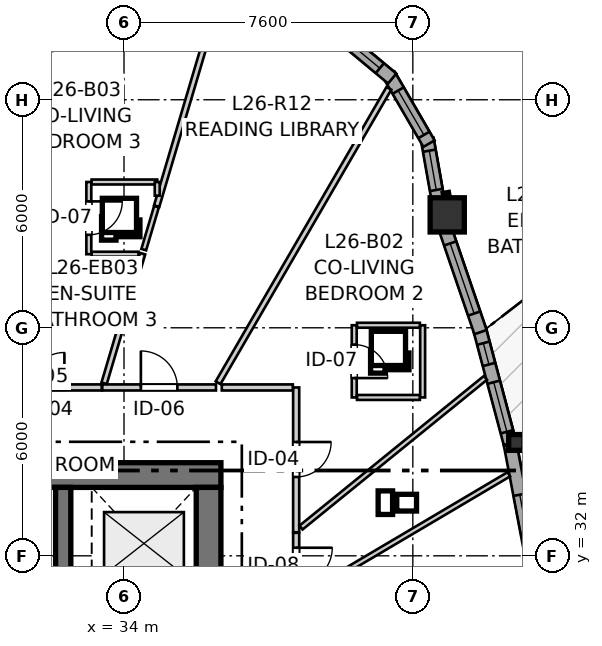
"""IFC4 building model, lengths in metres.
Left out: names, types, materials, properties, quantities, classifications, styles, units other than length and angle.
Written with IfcOpenShell. Run it as: python <this file> out.ifc"""

import sys

from ifc_helpers import new_model, si_unit, direction, frame, frame_2d, origin, origin_2d, place, context, subcontext, project, spatial, rectangle, i_section, extrude, source, transform, mapped, element, fill, save


model = new_model("IFC4")
c1 = context("Model", 3, precision=1e-05, world=origin(), true_north=direction((0.0, 1.0)))
c2 = subcontext(c1, "Body", "Model", "MODEL_VIEW")
j1 = project(units=[si_unit("LENGTHUNIT", "METRE"), si_unit("PLANEANGLEUNIT", "RADIAN")], contexts=[c1])
p1 = place(None, origin())
s1 = spatial("IfcSite", under=j1, at=p1, CompositionType="ELEMENT")
p2 = place(p1, origin())
s2 = spatial("IfcBuilding", under=s1, at=p2, CompositionType="ELEMENT")
p3 = place(p2, frame((0.0, 0.0, 89.6)))
s3 = spatial("IfcBuildingStorey", under=s2, at=p3, CompositionType="ELEMENT", Elevation=89.6)
p4 = place(p3, frame((36.55, 34.125, 0.0), z_axis=(0.0, 0.0, 1.0), x_axis=(-1.0, 0.0, 0.0)))
e1 = element("IfcWall", 1, at=p4, inside=s3, PredefinedType="SHEAR", context=c2, shape_type="SweptSolid", body=[
    extrude(rectangle(XDim=12.4, YDim=0.65, at=frame_2d((6.2, 0.0))), origin(), (0.0, 0.0, 1.0), 2.95),
])
p5 = place(p3, frame((36.225, 18.2, 0.0), z_axis=(0.0, 0.0, 1.0), x_axis=(0.0, 1.0, 0.0)))
e2 = element("IfcWall", 2, at=p5, inside=s3, PredefinedType="SHEAR", context=c2, shape_type="SweptSolid", body=[
    extrude(rectangle(XDim=15.6, YDim=0.65, at=frame_2d((7.8, 0.0))), origin(), (0.0, 0.0, 1.0), 2.95),
])
p6 = place(p5, frame((4.25, 0.0, 0.0)))
e3 = element("IfcOpeningElement", 3, at=p6, cuts=e2, PredefinedType="OPENING", context=c2, shape_type="SweptSolid", body=[
    extrude(rectangle(XDim=1.1, YDim=2.15, at=frame_2d((0.55, 1.075))), frame((0.0, 0.335, 0.0), z_axis=(0.0, -1.0, 0.0), x_axis=(1.0, 0.0, 0.0)), (0.0, 0.0, 1.0), 0.67),
])
p7 = place(p5, frame((10.25, 0.0, 0.0)))
e4 = element("IfcOpeningElement", 4, at=p7, cuts=e2, PredefinedType="OPENING", context=c2, shape_type="SweptSolid", body=[
    extrude(rectangle(XDim=1.1, YDim=2.15, at=frame_2d((0.55, 1.075))), frame((0.0, 0.335, 0.0), z_axis=(0.0, -1.0, 0.0), x_axis=(1.0, 0.0, 0.0)), (0.0, 0.0, 1.0), 0.67),
])
p8 = place(p3, frame((32.4, 30.85, 0.0), z_axis=(0.0, 0.0, 1.0), x_axis=(0.0, 1.0, 0.0)))
e5 = element("IfcWall", 5, at=p8, inside=s3, PredefinedType="SHEAR", context=c2, shape_type="SweptSolid", body=[
    extrude(rectangle(XDim=2.95, YDim=0.4, at=frame_2d((1.475, 0.0))), origin(), (0.0, 0.0, 1.0), 2.95),
])
m1 = source(origin(), c2, "Body", "SweptSolid", [
    extrude(i_section(OverallWidth=0.406, OverallDepth=0.416, WebThickness=0.027, FlangeThickness=0.044, FilletRadius=0.015, at=origin_2d()), origin(), (0.0, 0.0, 1.0), 2.95),
])
p9 = place(p3, frame((44.325, 34.983, 0.0), z_axis=(0.0, 0.0, 1.0), x_axis=(1.0, 0.0, 0.0)))
e6 = element("IfcColumn", 6, at=p9, inside=s3, PredefinedType="PILASTER", context=c2, shape_type="MappedRepresentation", body=[
    mapped(m1, transform((0.0, 0.0, 0.0), x_axis=(1.0, 0.0, 0.0), y_axis=(0.0, 1.0, 0.0), z_axis=(0.0, 0.0, 1.0), scale=1.0)),
])
m2 = source(origin(), c2, "Body", "SweptSolid", [
    extrude(rectangle(XDim=0.9, YDim=0.9, at=origin_2d()), origin(), (0.0, 0.0, 1.0), 2.95),
])
p10 = place(p3, frame((42.505, 40.971, 0.0), z_axis=(0.0, 0.0, 1.0), x_axis=(1.0, 0.0, 0.0)))
e7 = element("IfcColumn", 7, at=p10, inside=s3, PredefinedType="COLUMN", context=c2, shape_type="MappedRepresentation", body=[
    mapped(m2, transform((0.0, 0.0, 0.0), x_axis=(1.0, 0.0, 0.0), y_axis=(0.0, 1.0, 0.0), z_axis=(0.0, 0.0, 1.0), scale=1.0)),
])
p11 = place(p3, frame((44.735, 31.919, 0.0), z_axis=(0.0, 0.0, 1.0), x_axis=(-0.186735196273, 0.982410284185, 0.0)))
e8 = element("IfcWall", 8, at=p11, inside=s3, PredefinedType="SOLIDWALL", context=c2, shape_type="SweptSolid", body=[
    extrude(rectangle(XDim=3.066, YDim=0.34, at=frame_2d((1.533, 0.0))), origin(), (0.0, 0.0, 1.0), 2.48),
])
p12 = place(p11, frame((0.669, 0.0, 0.82)))
e9 = element("IfcOpeningElement", 9, at=p12, cuts=e8, PredefinedType="OPENING", context=c2, shape_type="SweptSolid", body=[
    extrude(rectangle(XDim=1.05, YDim=1.45, at=frame_2d((0.525, 0.725))), frame((0.0, 0.18, 0.0), z_axis=(0.0, -1.0, 0.0), x_axis=(1.0, 0.0, 0.0)), (0.0, 0.0, 1.0), 0.36),
])
p13 = place(p3, frame((44.156, 34.958, 0.0), z_axis=(0.0, 0.0, 1.0), x_axis=(-0.257033600382, 0.966402467026, 0.0)))
e10 = element("IfcWall", 10, at=p13, inside=s3, PredefinedType="SOLIDWALL", context=c2, shape_type="SweptSolid", body=[
    extrude(rectangle(XDim=3.116, YDim=0.34, at=frame_2d((1.558, 0.0))), origin(), (0.0, 0.0, 1.0), 2.48),
])
p14 = place(p13, frame((0.315, 0.0, 0.82)))
e11 = element("IfcOpeningElement", 11, at=p14, cuts=e10, PredefinedType="OPENING", context=c2, shape_type="SweptSolid", body=[
    extrude(rectangle(XDim=1.35, YDim=1.45, at=frame_2d((0.675, 0.725))), frame((0.0, 0.18, 0.0), z_axis=(0.0, -1.0, 0.0), x_axis=(1.0, 0.0, 0.0)), (0.0, 0.0, 1.0), 0.36),
])
p15 = place(p13, frame((2.148, 0.0, 0.82)))
e12 = element("IfcOpeningElement", 12, at=p15, cuts=e10, PredefinedType="OPENING", context=c2, shape_type="SweptSolid", body=[
    extrude(rectangle(XDim=0.58, YDim=1.35, at=frame_2d((0.29, 0.675))), frame((0.0, 0.18, 0.0), z_axis=(0.0, -1.0, 0.0), x_axis=(1.0, 0.0, 0.0)), (0.0, 0.0, 1.0), 0.36),
])
p16 = place(p3, frame((43.38, 37.886, 0.0), z_axis=(0.0, 0.0, 1.0), x_axis=(-0.323536742898, 0.946215607562, 0.0)))
e13 = element("IfcWall", 13, at=p16, inside=s3, PredefinedType="SOLIDWALL", context=c2, shape_type="SweptSolid", body=[
    extrude(rectangle(XDim=2.972, YDim=0.34, at=frame_2d((1.486, 0.0))), origin(), (0.0, 0.0, 1.0), 2.48),
])
p17 = place(p16, frame((0.516, 0.0, 0.82)))
e14 = element("IfcOpeningElement", 14, at=p17, cuts=e13, PredefinedType="OPENING", context=c2, shape_type="SweptSolid", body=[
    extrude(rectangle(XDim=1.95, YDim=1.4, at=frame_2d((0.975, 0.7))), frame((0.0, 0.18, 0.0), z_axis=(0.0, -1.0, 0.0), x_axis=(1.0, 0.0, 0.0)), (0.0, 0.0, 1.0), 0.36),
])
p18 = place(p3, frame((42.298, 41.168, 0.0), z_axis=(0.0, 0.0, 1.0), x_axis=(-0.17440141227, 0.984674640375, 0.0)))
e15 = element("IfcWall", 15, at=p18, inside=s3, PredefinedType="SOLIDWALL", context=c2, shape_type="SweptSolid", body=[
    extrude(rectangle(XDim=1.831, YDim=0.34, at=frame_2d((0.916, 0.0))), origin(), (0.0, 0.0, 1.0), 2.48),
])
p19 = place(p18, frame((0.466, 0.0, 0.82)))
e16 = element("IfcOpeningElement", 16, at=p19, cuts=e15, PredefinedType="OPENING", context=c2, shape_type="SweptSolid", body=[
    extrude(rectangle(XDim=1.05, YDim=1.45, at=frame_2d((0.525, 0.725))), frame((0.0, 0.18, 0.0), z_axis=(0.0, -1.0, 0.0), x_axis=(1.0, 0.0, 0.0)), (0.0, 0.0, 1.0), 0.36),
])
p20 = place(p3, frame((42.024, 42.845, 0.0), z_axis=(0.0, 0.0, 1.0), x_axis=(-0.501902596059, 0.864924149315, 0.0)))
e17 = element("IfcWall", 17, at=p20, inside=s3, PredefinedType="SOLIDWALL", context=c2, shape_type="SweptSolid", body=[
    extrude(rectangle(XDim=2.099, YDim=0.34, at=frame_2d((1.049, 0.0))), origin(), (0.0, 0.0, 1.0), 2.48),
])
p21 = place(p20, frame((0.265, 0.0, 0.82)))
e18 = element("IfcOpeningElement", 18, at=p21, cuts=e17, PredefinedType="OPENING", context=c2, shape_type="SweptSolid", body=[
    extrude(rectangle(XDim=1.35, YDim=1.45, at=frame_2d((0.675, 0.725))), frame((0.0, 0.18, 0.0), z_axis=(0.0, -1.0, 0.0), x_axis=(1.0, 0.0, 0.0)), (0.0, 0.0, 1.0), 0.36),
])
p22 = place(p3, frame((41.057, 44.558, 0.0), z_axis=(0.0, 0.0, 1.0), x_axis=(-0.768497696041, 0.639852554249, 0.0)))
e19 = element("IfcWall", 19, at=p22, inside=s3, PredefinedType="SOLIDWALL", context=c2, shape_type="SweptSolid", body=[
    extrude(rectangle(XDim=2.099, YDim=0.34, at=frame_2d((1.049, 0.0))), origin(), (0.0, 0.0, 1.0), 2.48),
])
p23 = place(p22, frame((0.425, 0.0, 0.82)))
e20 = element("IfcOpeningElement", 20, at=p23, cuts=e19, PredefinedType="OPENING", context=c2, shape_type="SweptSolid", body=[
    extrude(rectangle(XDim=1.25, YDim=1.35, at=frame_2d((0.625, 0.675))), frame((0.0, 0.18, 0.0), z_axis=(0.0, -1.0, 0.0), x_axis=(1.0, 0.0, 0.0)), (0.0, 0.0, 1.0), 0.36),
])
p24 = place(p3, frame((33.774, 45.797, 0.0), z_axis=(0.0, 0.0, 1.0), x_axis=(-0.979428519707, -0.201791414051, 0.0)))
e21 = element("IfcWall", 21, at=p24, inside=s3, PredefinedType="SOLIDWALL", context=c2, shape_type="SweptSolid", body=[
    extrude(rectangle(XDim=3.134, YDim=0.34, at=frame_2d((1.567, 0.0))), origin(), (0.0, 0.0, 1.0), 2.48),
])
p25 = place(p24, frame((0.832, 0.0, 0.82)))
e22 = element("IfcOpeningElement", 22, at=p25, cuts=e21, PredefinedType="OPENING", context=c2, shape_type="SweptSolid", body=[
    extrude(rectangle(XDim=1.45, YDim=1.25, at=frame_2d((0.725, 0.625))), frame((0.0, 0.18, 0.0), z_axis=(0.0, -1.0, 0.0), x_axis=(1.0, 0.0, 0.0)), (0.0, 0.0, 1.0), 0.36),
])
p26 = place(p3, frame((38.53, 36.43, 0.0), z_axis=(0.0, 0.0, 1.0), x_axis=(0.0, -1.0, 0.0)))
e23 = element("IfcWall", 23, at=p26, inside=s3, PredefinedType="PARTITIONING", context=c2, shape_type="SweptSolid", body=[
    extrude(rectangle(XDim=3.81, YDim=0.16, at=frame_2d((1.905, 0.0))), origin(), (0.0, 0.0, 1.0), 2.588),
])
p27 = place(p26, frame((1.436, 0.0, 0.0)))
e24 = element("IfcOpeningElement", 24, at=p27, cuts=e23, PredefinedType="OPENING", context=c2, shape_type="SweptSolid", body=[
    extrude(rectangle(XDim=0.92, YDim=2.1, at=frame_2d((0.46, 1.05))), frame((0.0, 0.09, 0.0), z_axis=(0.0, -1.0, 0.0), x_axis=(1.0, 0.0, 0.0)), (0.0, 0.0, 1.0), 0.18),
])
p28 = place(p3, frame((33.428, 36.43, 0.0), z_axis=(0.0, 0.0, 1.0), x_axis=(1.0, 0.0, 0.0)))
e25 = element("IfcWall", 25, at=p28, inside=s3, PredefinedType="PARTITIONING", context=c2, shape_type="SweptSolid", body=[
    extrude(rectangle(XDim=2.992, YDim=0.16, at=frame_2d((1.496, 0.0))), origin(), (0.0, 0.0, 1.0), 2.95),
])
p29 = place(p28, frame((1.015, 0.0, 0.0)))
e26 = element("IfcOpeningElement", 26, at=p29, cuts=e25, PredefinedType="OPENING", context=c2, shape_type="SweptSolid", body=[
    extrude(rectangle(XDim=0.96, YDim=2.1, at=frame_2d((0.48, 1.05))), frame((0.0, 0.09, 0.0), z_axis=(0.0, -1.0, 0.0), x_axis=(1.0, 0.0, 0.0)), (0.0, 0.0, 1.0), 0.18),
])
p30 = place(p3, frame((30.529, 36.43, 0.0), z_axis=(0.0, 0.0, 1.0), x_axis=(1.0, 0.0, 0.0)))
e27 = element("IfcWall", 27, at=p30, inside=s3, PredefinedType="PARTITIONING", context=c2, shape_type="SweptSolid", body=[
    extrude(rectangle(XDim=2.884, YDim=0.16, at=frame_2d((1.442, 0.0))), origin(), (0.0, 0.0, 1.0), 2.95),
])
p31 = place(p30, frame((0.982, 0.0, 0.0)))
e28 = element("IfcOpeningElement", 28, at=p31, cuts=e27, PredefinedType="OPENING", context=c2, shape_type="SweptSolid", body=[
    extrude(rectangle(XDim=0.92, YDim=2.1, at=frame_2d((0.46, 1.05))), frame((0.0, 0.09, 0.0), z_axis=(0.0, -1.0, 0.0), x_axis=(1.0, 0.0, 0.0)), (0.0, 0.0, 1.0), 0.18),
])
p32 = place(p3, frame((40.058, 38.067, 0.0), z_axis=(0.0, 0.0, 1.0), x_axis=(0.0, -1.0, 0.0)))
e29 = element("IfcWall", 29, at=p32, inside=s3, PredefinedType="PARTITIONING", context=c2, shape_type="SweptSolid", body=[
    extrude(rectangle(XDim=1.9, YDim=0.13, at=frame_2d((0.95, 0.0))), origin(), (0.0, 0.0, 1.0), 2.95),
])
p33 = place(p32, frame((0.51, 0.0, 0.0)))
e30 = element("IfcOpeningElement", 30, at=p33, cuts=e29, PredefinedType="OPENING", context=c2, shape_type="SweptSolid", body=[
    extrude(rectangle(XDim=0.88, YDim=2.05, at=frame_2d((0.44, 1.025))), frame((0.0, 0.075, 0.0), z_axis=(0.0, -1.0, 0.0), x_axis=(1.0, 0.0, 0.0)), (0.0, 0.0, 1.0), 0.15),
])
p34 = place(p3, frame((33.074, 41.836, 0.0), z_axis=(0.0, 0.0, 1.0), x_axis=(0.0, -1.0, 0.0)))
e31 = element("IfcWall", 31, at=p34, inside=s3, PredefinedType="PARTITIONING", context=c2, shape_type="SweptSolid", body=[
    extrude(rectangle(XDim=1.9, YDim=0.13, at=frame_2d((0.95, 0.0))), origin(), (0.0, 0.0, 1.0), 2.95),
])
p35 = place(p34, frame((0.51, 0.0, 0.0)))
e32 = element("IfcOpeningElement", 32, at=p35, cuts=e31, PredefinedType="OPENING", context=c2, shape_type="SweptSolid", body=[
    extrude(rectangle(XDim=0.88, YDim=2.05, at=frame_2d((0.44, 1.025))), frame((0.0, 0.075, 0.0), z_axis=(0.0, -1.0, 0.0), x_axis=(1.0, 0.0, 0.0)), (0.0, 0.0, 1.0), 0.15),
])
p36 = place(p3, frame((38.53, 32.605, 0.0), z_axis=(0.0, 0.0, 1.0), x_axis=(0.0, -1.0, 0.0)))
e33 = element("IfcWall", 33, at=p36, inside=s3, PredefinedType="PARTITIONING", context=c2, shape_type="SweptSolid", body=[
    extrude(rectangle(XDim=1.786, YDim=0.16, at=frame_2d((0.893, 0.0))), origin(), (0.0, 0.0, 1.0), 2.95),
])
p37 = place(p36, frame((0.393, 0.0, 0.0)))
e34 = element("IfcOpeningElement", 34, at=p37, cuts=e33, PredefinedType="OPENING", context=c2, shape_type="SweptSolid", body=[
    extrude(rectangle(XDim=0.95, YDim=2.1, at=frame_2d((0.475, 1.05))), frame((0.0, 0.09, 0.0), z_axis=(0.0, -1.0, 0.0), x_axis=(1.0, 0.0, 0.0)), (0.0, 0.0, 1.0), 0.18),
])
p38 = place(p3, frame((36.475, 36.553, 0.0), z_axis=(0.0, 0.0, 1.0), x_axis=(0.501895508122, 0.864928262301, 0.0)))
e35 = element("IfcWall", 35, at=p38, inside=s3, PredefinedType="PARTITIONING", context=c2, shape_type="SweptSolid", body=[
    extrude(rectangle(XDim=8.958, YDim=0.145, at=frame_2d((4.479, 0.0))), origin(), (0.0, 0.0, 1.0), 2.95),
])
p39 = place(p3, frame((38.65, 30.907, 0.0), z_axis=(0.0, 0.0, 1.0), x_axis=(0.860799697267, 0.508943888052, 0.0)))
e36 = element("IfcWall", 36, at=p39, inside=s3, PredefinedType="PARTITIONING", context=c2, shape_type="SweptSolid", body=[
    extrude(rectangle(XDim=6.363, YDim=0.13, at=frame_2d((3.181, 0.0))), origin(), (0.0, 0.0, 1.0), 2.95),
])
p40 = place(p3, frame((38.657, 32.742, 0.0), z_axis=(0.0, 0.0, 1.0), x_axis=(0.776413778101, 0.630223488276, 0.0)))
e37 = element("IfcWall", 37, at=p40, inside=s3, PredefinedType="PARTITIONING", context=c2, shape_type="SweptSolid", body=[
    extrude(rectangle(XDim=6.251, YDim=0.13, at=frame_2d((3.125, 0.0))), origin(), (0.0, 0.0, 1.0), 2.95),
])
p41 = place(p3, frame((34.859, 41.201, 0.0), z_axis=(0.0, 0.0, 1.0), x_axis=(0.284335435967, 0.958724861393, 0.0)))
e38 = element("IfcWall", 38, at=p41, inside=s3, PredefinedType="PARTITIONING", context=c2, shape_type="SweptSolid", body=[
    extrude(rectangle(XDim=5.348, YDim=0.145, at=frame_2d((2.674, 0.0))), origin(), (0.0, 0.0, 1.0), 2.95),
])
p42 = place(p3, frame((33.476, 36.538, 0.0), z_axis=(0.0, 0.0, 1.0), x_axis=(0.284300835747, 0.958735122332, 0.0)))
e39 = element("IfcWall", 39, at=p42, inside=s3, PredefinedType="PARTITIONING", context=c2, shape_type="SweptSolid", body=[
    extrude(rectangle(XDim=3.56, YDim=0.145, at=frame_2d((1.78, 0.0))), origin(), (0.0, 0.0, 1.0), 2.95),
])
p43 = place(p3, frame((36.573, 36.43, 0.0), z_axis=(0.0, 0.0, 1.0), x_axis=(1.0, 0.0, 0.0)))
e40 = element("IfcWall", 40, at=p43, inside=s3, PredefinedType="PARTITIONING", context=c2, shape_type="SweptSolid", body=[
    extrude(rectangle(XDim=1.869, YDim=0.16, at=frame_2d((0.934, 0.0))), origin(), (0.0, 0.0, 1.0), 2.588),
])
p44 = place(p3, frame((41.858, 36.167, 0.0), z_axis=(0.0, 0.0, 1.0), x_axis=(0.0, 1.0, 0.0)))
e41 = element("IfcWall", 41, at=p44, inside=s3, PredefinedType="PARTITIONING", context=c2, shape_type="SweptSolid", body=[
    extrude(rectangle(XDim=1.9, YDim=0.13, at=frame_2d((0.95, 0.0))), origin(), (0.0, 0.0, 1.0), 2.95),
])
p45 = place(p3, frame((33.147, 41.836, 0.0), z_axis=(0.0, 0.0, 1.0), x_axis=(1.0, 0.0, 0.0)))
e42 = element("IfcWall", 42, at=p45, inside=s3, PredefinedType="PARTITIONING", context=c2, shape_type="SweptSolid", body=[
    extrude(rectangle(XDim=1.727, YDim=0.13, at=frame_2d((0.864, 0.0))), origin(), (0.0, 0.0, 1.0), 2.95),
])
for number, where, z_axis, x_axis in (
    (43, (40.131, 38.067, 0.0), (0.0, 0.0, 1.0), (1.0, 0.0, 0.0)),
    (44, (40.131, 36.167, 0.0), (0.0, 0.0, 1.0), (1.0, 0.0, 0.0)),
):
    element("IfcWall", number, at=place(p3, frame(where, z_axis=z_axis, x_axis=x_axis)), inside=s3, PredefinedType="PARTITIONING", context=c2, shape_type="SweptSolid", body=[
        extrude(rectangle(XDim=1.654, YDim=0.13, at=frame_2d((0.827, 0.0))), origin(), (0.0, 0.0, 1.0), 2.95),
    ])
p46 = place(p3, frame((33.147, 39.936, 0.0), z_axis=(0.0, 0.0, 1.0), x_axis=(1.0, 0.0, 0.0)))
e45 = element("IfcWall", 45, at=p46, inside=s3, PredefinedType="PARTITIONING", context=c2, shape_type="SweptSolid", body=[
    extrude(rectangle(XDim=1.234, YDim=0.13, at=frame_2d((0.617, 0.0))), origin(), (0.0, 0.0, 1.0), 2.558),
])
p47 = place(p3, frame((34.519, 40.057, 0.0), z_axis=(0.0, 0.0, 1.0), x_axis=(0.284363334184, 0.958716586991, 0.0)))
e46 = element("IfcWall", 46, at=p47, inside=s3, PredefinedType="PARTITIONING", context=c2, shape_type="SweptSolid", body=[
    extrude(rectangle(XDim=1.179, YDim=0.13, at=frame_2d((0.589, 0.0))), origin(), (0.0, 0.0, 1.0), 2.95),
])
p48 = place(p3, frame((34.874, 41.477, 0.0), z_axis=(0.0, 0.0, 1.0), x_axis=(0.0, 1.0, 0.0)))
e47 = element("IfcWall", 47, at=p48, inside=s3, PredefinedType="PARTITIONING", context=c2, shape_type="SweptSolid", body=[
    extrude(rectangle(XDim=0.359, YDim=0.13, at=frame_2d((0.179, 0.0))), origin(), (0.0, 0.0, 1.0), 2.95),
])
m3 = source(origin(), c2, "Body", "SweptSolid", [
    extrude(rectangle(XDim=1.05, YDim=1.45, at=frame_2d((0.525, 0.725))), frame((0.0, 0.03, 0.0), z_axis=(0.0, -1.0, 0.0), x_axis=(1.0, 0.0, 0.0)), (0.0, 0.0, 1.0), 0.06),
])
p49 = place(p12, origin())
e48 = element("IfcWindow", 48, at=p49, inside=s3, PartitioningType="SINGLE_PANEL", PredefinedType="WINDOW", context=c2, shape_type="MappedRepresentation", body=[
    mapped(m3, transform((0.0, 0.0, 0.0), x_axis=(1.0, 0.0, 0.0), y_axis=(0.0, 1.0, 0.0), z_axis=(0.0, 0.0, 1.0), scale=1.0)),
])
fill(e9, e48)
m4 = source(origin(), c2, "Body", "SweptSolid", [
    extrude(rectangle(XDim=1.35, YDim=1.45, at=frame_2d((0.675, 0.725))), frame((0.0, 0.03, 0.0), z_axis=(0.0, -1.0, 0.0), x_axis=(1.0, 0.0, 0.0)), (0.0, 0.0, 1.0), 0.06),
])
p50 = place(p14, origin())
e49 = element("IfcWindow", 49, at=p50, inside=s3, PartitioningType="SINGLE_PANEL", PredefinedType="WINDOW", context=c2, shape_type="MappedRepresentation", body=[
    mapped(m4, transform((0.0, 0.0, 0.0), x_axis=(1.0, 0.0, 0.0), y_axis=(0.0, 1.0, 0.0), z_axis=(0.0, 0.0, 1.0), scale=1.0)),
])
fill(e11, e49)
m5 = source(origin(), c2, "Body", "SweptSolid", [
    extrude(rectangle(XDim=0.58, YDim=1.35, at=frame_2d((0.29, 0.675))), frame((0.0, 0.03, 0.0), z_axis=(0.0, -1.0, 0.0), x_axis=(1.0, 0.0, 0.0)), (0.0, 0.0, 1.0), 0.06),
])
p51 = place(p15, origin())
e50 = element("IfcWindow", 50, at=p51, inside=s3, PartitioningType="SINGLE_PANEL", PredefinedType="WINDOW", context=c2, shape_type="MappedRepresentation", body=[
    mapped(m5, transform((0.0, 0.0, 0.0), x_axis=(1.0, 0.0, 0.0), y_axis=(0.0, 1.0, 0.0), z_axis=(0.0, 0.0, 1.0), scale=1.0)),
])
fill(e12, e50)
m6 = source(origin(), c2, "Body", "SweptSolid", [
    extrude(rectangle(XDim=1.95, YDim=1.4, at=frame_2d((0.975, 0.7))), frame((0.0, 0.03, 0.0), z_axis=(0.0, -1.0, 0.0), x_axis=(1.0, 0.0, 0.0)), (0.0, 0.0, 1.0), 0.06),
])
p52 = place(p17, origin())
e51 = element("IfcWindow", 51, at=p52, inside=s3, PartitioningType="SINGLE_PANEL", PredefinedType="WINDOW", context=c2, shape_type="MappedRepresentation", body=[
    mapped(m6, transform((0.0, 0.0, 0.0), x_axis=(1.0, 0.0, 0.0), y_axis=(0.0, 1.0, 0.0), z_axis=(0.0, 0.0, 1.0), scale=1.0)),
])
fill(e14, e51)
p53 = place(p19, origin())
e52 = element("IfcWindow", 52, at=p53, inside=s3, PartitioningType="SINGLE_PANEL", PredefinedType="WINDOW", context=c2, shape_type="MappedRepresentation", body=[
    mapped(m3, transform((0.0, 0.0, 0.0), x_axis=(1.0, 0.0, 0.0), y_axis=(0.0, 1.0, 0.0), z_axis=(0.0, 0.0, 1.0), scale=1.0)),
])
fill(e16, e52)
p54 = place(p21, origin())
e53 = element("IfcWindow", 53, at=p54, inside=s3, PartitioningType="SINGLE_PANEL", PredefinedType="WINDOW", context=c2, shape_type="MappedRepresentation", body=[
    mapped(m4, transform((0.0, 0.0, 0.0), x_axis=(1.0, 0.0, 0.0), y_axis=(0.0, 1.0, 0.0), z_axis=(0.0, 0.0, 1.0), scale=1.0)),
])
fill(e18, e53)
m7 = source(origin(), c2, "Body", "SweptSolid", [
    extrude(rectangle(XDim=1.25, YDim=1.35, at=frame_2d((0.625, 0.675))), frame((0.0, 0.03, 0.0), z_axis=(0.0, -1.0, 0.0), x_axis=(1.0, 0.0, 0.0)), (0.0, 0.0, 1.0), 0.06),
])
p55 = place(p23, origin())
e54 = element("IfcWindow", 54, at=p55, inside=s3, PartitioningType="SINGLE_PANEL", PredefinedType="WINDOW", context=c2, shape_type="MappedRepresentation", body=[
    mapped(m7, transform((0.0, 0.0, 0.0), x_axis=(1.0, 0.0, 0.0), y_axis=(0.0, 1.0, 0.0), z_axis=(0.0, 0.0, 1.0), scale=1.0)),
])
fill(e20, e54)
m8 = source(origin(), c2, "Body", "SweptSolid", [
    extrude(rectangle(XDim=0.92, YDim=2.1, at=frame_2d((0.46, 1.05))), frame((0.0, 0.025, 0.0), z_axis=(0.0, -1.0, 0.0), x_axis=(1.0, 0.0, 0.0)), (0.0, 0.0, 1.0), 0.05),
])
p56 = place(p27, origin())
e55 = element("IfcDoor", 55, at=p56, inside=s3, OperationType="SINGLE_SWING_LEFT", PredefinedType="DOOR", context=c2, shape_type="MappedRepresentation", body=[
    mapped(m8, transform((0.0, 0.0, 0.0), x_axis=(1.0, 0.0, 0.0), y_axis=(0.0, 1.0, 0.0), z_axis=(0.0, 0.0, 1.0), scale=1.0)),
])
fill(e24, e55)
m9 = source(origin(), c2, "Body", "SweptSolid", [
    extrude(rectangle(XDim=0.96, YDim=2.1, at=frame_2d((0.48, 1.05))), frame((0.0, 0.025, 0.0), z_axis=(0.0, -1.0, 0.0), x_axis=(1.0, 0.0, 0.0)), (0.0, 0.0, 1.0), 0.05),
])
p57 = place(p29, origin())
e56 = element("IfcDoor", 56, at=p57, inside=s3, OperationType="SINGLE_SWING_LEFT", PredefinedType="DOOR", context=c2, shape_type="MappedRepresentation", body=[
    mapped(m9, transform((0.0, 0.0, 0.0), x_axis=(1.0, 0.0, 0.0), y_axis=(0.0, 1.0, 0.0), z_axis=(0.0, 0.0, 1.0), scale=1.0)),
])
fill(e26, e56)
p58 = place(p31, origin())
e57 = element("IfcDoor", 57, at=p58, inside=s3, OperationType="SINGLE_SWING_RIGHT", PredefinedType="DOOR", context=c2, shape_type="MappedRepresentation", body=[
    mapped(m8, transform((0.0, 0.0, 0.0), x_axis=(1.0, 0.0, 0.0), y_axis=(0.0, 1.0, 0.0), z_axis=(0.0, 0.0, 1.0), scale=1.0)),
])
fill(e28, e57)
m10 = source(origin(), c2, "Body", "SweptSolid", [
    extrude(rectangle(XDim=0.88, YDim=2.05, at=frame_2d((0.44, 1.025))), frame((0.0, 0.025, 0.0), z_axis=(0.0, -1.0, 0.0), x_axis=(1.0, 0.0, 0.0)), (0.0, 0.0, 1.0), 0.05),
])
p59 = place(p33, origin())
e58 = element("IfcDoor", 58, at=p59, inside=s3, OperationType="SINGLE_SWING_RIGHT", PredefinedType="DOOR", context=c2, shape_type="MappedRepresentation", body=[
    mapped(m10, transform((0.0, 0.0, 0.0), x_axis=(1.0, 0.0, 0.0), y_axis=(0.0, 1.0, 0.0), z_axis=(0.0, 0.0, 1.0), scale=1.0)),
])
fill(e30, e58)
p60 = place(p35, origin())
e59 = element("IfcDoor", 59, at=p60, inside=s3, OperationType="SINGLE_SWING_LEFT", PredefinedType="DOOR", context=c2, shape_type="MappedRepresentation", body=[
    mapped(m10, transform((0.0, 0.0, 0.0), x_axis=(1.0, 0.0, 0.0), y_axis=(0.0, 1.0, 0.0), z_axis=(0.0, 0.0, 1.0), scale=1.0)),
])
fill(e32, e59)
m11 = source(origin(), c2, "Body", "SweptSolid", [
    extrude(rectangle(XDim=0.95, YDim=2.1, at=frame_2d((0.475, 1.05))), frame((0.0, 0.025, 0.0), z_axis=(0.0, -1.0, 0.0), x_axis=(1.0, 0.0, 0.0)), (0.0, 0.0, 1.0), 0.05),
])
p61 = place(p37, origin())
e60 = element("IfcDoor", 60, at=p61, inside=s3, OperationType="SINGLE_SWING_LEFT", PredefinedType="DOOR", context=c2, shape_type="MappedRepresentation", body=[
    mapped(m11, transform((0.0, 0.0, 0.0), x_axis=(1.0, 0.0, 0.0), y_axis=(0.0, 1.0, 0.0), z_axis=(0.0, 0.0, 1.0), scale=1.0)),
])
fill(e34, e60)
save(model, sys.argv[1])
